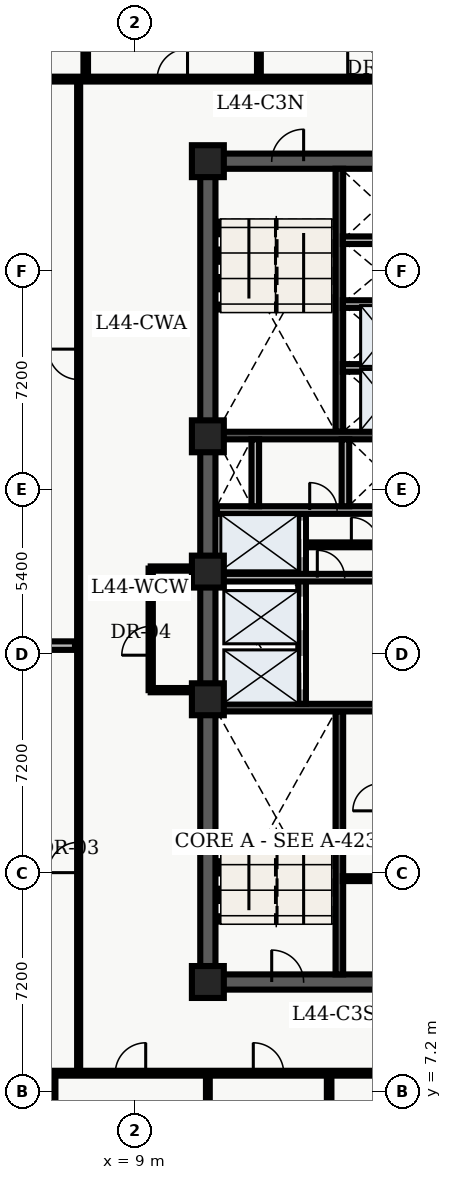
"""IFC4 building model, lengths in metres.
Left out: names, types, materials, properties, quantities, classifications, styles, units other than length and angle.
Written with IfcOpenShell. Run it as: python <this file> out.ifc"""

import sys

from ifc_helpers import new_model, entity, si_unit, converted_unit, direction, frame, origin_with_axes, origin_2d_with_axis, place, context, subcontext, project, spatial, polyline, rectangle, outline, extrude, element, fill, save


model = new_model("IFC4")
c1 = context("Model", 3, precision=1e-05, world=origin_with_axes(), true_north=direction((0.0, 1.0)))
c2 = subcontext(c1, "Body", "Model", "MODEL_VIEW")
j1 = project(units=[si_unit("LENGTHUNIT", "METRE"), converted_unit("PLANEANGLEUNIT", "DEGREE", entity("IfcPlaneAngleMeasure", 0.017), si_unit("PLANEANGLEUNIT", "RADIAN"), dimensions=[0, 0, 0, 0, 0, 0, 0])], contexts=[c1])
p1 = place(None, origin_with_axes())
s1 = spatial("IfcSite", under=j1, at=p1, CompositionType="ELEMENT")
p2 = place(p1, origin_with_axes())
s2 = spatial("IfcBuilding", under=s1, at=p2, CompositionType="ELEMENT")
p3 = place(p2, frame((0.0, 0.0, 179.7), z_axis=(0.0, 0.0, 1.0), x_axis=(1.0, 0.0, 0.0)))
s3 = spatial("IfcBuildingStorey", under=s2, at=p3, CompositionType="ELEMENT", Elevation=179.7)
p4 = place(p3, frame((11.4, 10.8, 0.0), z_axis=(0.0, 0.0, 1.0), x_axis=(0.0, 1.0, 0.0)))
e1 = element("IfcWall", 1, at=p4, inside=s3, PredefinedType="SHEAR", context=c2, shape_type="SweptSolid", body=[
    extrude(outline(polyline([(0.0, -0.25), (27.0, -0.25), (27.0, 0.25), (0.0, 0.25), (0.0, -0.25)])), origin_with_axes(), (0.0, 0.0, 1.0), 3.66),
])
p5 = place(p3, frame((11.4, 10.8, 0.0), z_axis=(0.0, 0.0, 1.0), x_axis=(1.0, 0.0, 0.0)))
e2 = element("IfcWall", 2, at=p5, inside=s3, PredefinedType="SHEAR", context=c2, shape_type="SweptSolid", body=[
    extrude(outline(polyline([(0.0, -0.25), (7.2, -0.25), (7.2, 0.25), (0.0, 0.25), (0.0, -0.25)])), origin_with_axes(), (0.0, 0.0, 1.0), 3.66),
])
p6 = place(p5, frame((2.625, 0.0, 0.0), z_axis=(0.0, 0.0, 1.0), x_axis=(1.0, 0.0, 0.0)))
e3 = element("IfcOpeningElement", 3, at=p6, cuts=e2, PredefinedType="OPENING", context=c2, shape_type="SweptSolid", body=[
    extrude(rectangle(XDim=1.05, YDim=0.52, at=origin_2d_with_axis()), origin_with_axes(), (0.0, 0.0, 1.0), 2.15),
])
p7 = place(p3, frame((11.4, 37.8, 0.0), z_axis=(0.0, 0.0, 1.0), x_axis=(1.0, 0.0, 0.0)))
e4 = element("IfcWall", 4, at=p7, inside=s3, PredefinedType="SHEAR", context=c2, shape_type="SweptSolid", body=[
    extrude(outline(polyline([(0.0, -0.25), (7.2, -0.25), (7.2, 0.25), (0.0, 0.25), (0.0, -0.25)])), origin_with_axes(), (0.0, 0.0, 1.0), 3.66),
])
p8 = place(p7, frame((2.625, 0.0, 0.0), z_axis=(0.0, 0.0, 1.0), x_axis=(1.0, 0.0, 0.0)))
e5 = element("IfcOpeningElement", 5, at=p8, cuts=e4, PredefinedType="OPENING", context=c2, shape_type="SweptSolid", body=[
    extrude(rectangle(XDim=1.05, YDim=0.52, at=origin_2d_with_axis()), origin_with_axes(), (0.0, 0.0, 1.0), 2.15),
])
p9 = place(p3, frame((15.725, 11.05, 0.0), z_axis=(0.0, 0.0, 1.0), x_axis=(0.0, 1.0, 0.0)))
e6 = element("IfcWall", 6, at=p9, inside=s3, PredefinedType="SHEAR", context=c2, shape_type="SweptSolid", body=[
    extrude(outline(polyline([(0.0, -0.125), (8.65, -0.125), (8.65, 0.125), (0.0, 0.125), (0.0, -0.125)])), origin_with_axes(), (0.0, 0.0, 1.0), 3.66),
])
p10 = place(p3, frame((11.65, 19.825, 0.0), z_axis=(0.0, 0.0, 1.0), x_axis=(1.0, 0.0, 0.0)))
e7 = element("IfcWall", 7, at=p10, inside=s3, PredefinedType="SHEAR", context=c2, shape_type="SweptSolid", body=[
    extrude(outline(polyline([(0.0, -0.125), (6.7, -0.125), (6.7, 0.125), (0.0, 0.125), (0.0, -0.125)])), origin_with_axes(), (0.0, 0.0, 1.0), 3.66),
])
p11 = place(p3, frame((15.725, 28.9, 0.0), z_axis=(0.0, 0.0, 1.0), x_axis=(0.0, 1.0, 0.0)))
e8 = element("IfcWall", 8, at=p11, inside=s3, PredefinedType="SHEAR", context=c2, shape_type="SweptSolid", body=[
    extrude(outline(polyline([(0.0, -0.125), (8.65, -0.125), (8.65, 0.125), (0.0, 0.125), (0.0, -0.125)])), origin_with_axes(), (0.0, 0.0, 1.0), 3.66),
])
p12 = place(p3, frame((11.65, 28.775, 0.0), z_axis=(0.0, 0.0, 1.0), x_axis=(1.0, 0.0, 0.0)))
e9 = element("IfcWall", 9, at=p12, inside=s3, PredefinedType="SHEAR", context=c2, shape_type="SweptSolid", body=[
    extrude(outline(polyline([(0.0, -0.125), (6.7, -0.125), (6.7, 0.125), (0.0, 0.125), (0.0, -0.125)])), origin_with_axes(), (0.0, 0.0, 1.0), 3.66),
])
p13 = place(p3, frame((14.5, 19.95, 0.0), z_axis=(0.0, 0.0, 1.0), x_axis=(0.0, 1.0, 0.0)))
e10 = element("IfcWall", 10, at=p13, inside=s3, PredefinedType="SOLIDWALL", context=c2, shape_type="SweptSolid", body=[
    extrude(outline(polyline([(0.0, -0.125), (6.25, -0.125), (6.25, 0.125), (0.0, 0.125), (0.0, -0.125)])), origin_with_axes(), (0.0, 0.0, 1.0), 2.7),
])
p14 = place(p13, frame((1.025, 0.0, 0.0), z_axis=(0.0, 0.0, 1.0), x_axis=(1.0, 0.0, 0.0)))
e11 = element("IfcOpeningElement", 11, at=p14, cuts=e10, PredefinedType="OPENING", context=c2, shape_type="SweptSolid", body=[
    extrude(rectangle(XDim=1.1, YDim=0.27, at=origin_2d_with_axis()), origin_with_axes(), (0.0, 0.0, 1.0), 2.15),
])
p15 = place(p13, frame((2.975, 0.0, 0.0), z_axis=(0.0, 0.0, 1.0), x_axis=(1.0, 0.0, 0.0)))
e12 = element("IfcOpeningElement", 12, at=p15, cuts=e10, PredefinedType="OPENING", context=c2, shape_type="SweptSolid", body=[
    extrude(rectangle(XDim=1.1, YDim=0.27, at=origin_2d_with_axis()), origin_with_axes(), (0.0, 0.0, 1.0), 2.15),
])
p16 = place(p13, frame((5.425, 0.0, 0.0), z_axis=(0.0, 0.0, 1.0), x_axis=(1.0, 0.0, 0.0)))
e13 = element("IfcOpeningElement", 13, at=p16, cuts=e10, PredefinedType="OPENING", context=c2, shape_type="SweptSolid", body=[
    extrude(rectangle(XDim=1.2, YDim=0.27, at=origin_2d_with_axis()), origin_with_axes(), (0.0, 0.0, 1.0), 2.15),
])
p17 = place(p3, frame((11.7, 24.1, 0.0), z_axis=(0.0, 0.0, 1.0), x_axis=(1.0, 0.0, 0.0)))
e14 = element("IfcWall", 14, at=p17, inside=s3, PredefinedType="SOLIDWALL", context=c2, shape_type="SweptSolid", body=[
    extrude(outline(polyline([(0.0, -0.125), (6.6, -0.125), (6.6, 0.125), (0.0, 0.125), (0.0, -0.125)])), origin_with_axes(), (0.0, 0.0, 1.0), 2.7),
])
p18 = place(p17, frame((3.75, 0.0, 0.0), z_axis=(0.0, 0.0, 1.0), x_axis=(1.0, 0.0, 0.0)))
e15 = element("IfcOpeningElement", 15, at=p18, cuts=e14, PredefinedType="OPENING", context=c2, shape_type="SweptSolid", body=[
    extrude(rectangle(XDim=0.9, YDim=0.27, at=origin_2d_with_axis()), origin_with_axes(), (0.0, 0.0, 1.0), 2.15),
])
p19 = place(p3, frame((11.7, 26.325, 0.0), z_axis=(0.0, 0.0, 1.0), x_axis=(1.0, 0.0, 0.0)))
e16 = element("IfcWall", 16, at=p19, inside=s3, PredefinedType="SOLIDWALL", context=c2, shape_type="SweptSolid", body=[
    extrude(outline(polyline([(0.0, -0.125), (6.6, -0.125), (6.6, 0.125), (0.0, 0.125), (0.0, -0.125)])), origin_with_axes(), (0.0, 0.0, 1.0), 2.7),
])
p20 = place(p19, frame((3.5, 0.0, 0.0), z_axis=(0.0, 0.0, 1.0), x_axis=(1.0, 0.0, 0.0)))
e17 = element("IfcOpeningElement", 17, at=p20, cuts=e16, PredefinedType="OPENING", context=c2, shape_type="SweptSolid", body=[
    extrude(rectangle(XDim=0.9, YDim=0.27, at=origin_2d_with_axis()), origin_with_axes(), (0.0, 0.0, 1.0), 2.15),
])
for number, where, z_axis, x_axis in (
    (18, (12.96, 26.45, 0.0), (0.0, 0.0, 1.0), (0.0, 1.0, 0.0)),
    (19, (15.925, 26.45, 0.0), (0.0, 0.0, 1.0), (0.0, 1.0, 0.0)),
):
    element("IfcWall", number, at=place(p3, frame(where, z_axis=z_axis, x_axis=x_axis)), inside=s3, PredefinedType="SOLIDWALL", context=c2, shape_type="SweptSolid", body=[
        extrude(outline(polyline([(0.0, -0.125), (2.2, -0.125), (2.2, 0.125), (0.0, 0.125), (0.0, -0.125)])), origin_with_axes(), (0.0, 0.0, 1.0), 2.7),
    ])
for number, where, z_axis, x_axis in (
    (20, (11.4, 10.8, 0.0), (0.0, 0.0, 1.0), (1.0, 0.0, 0.0)),
    (21, (11.4, 20.1, 0.0), (0.0, 0.0, 1.0), (1.0, 0.0, 0.0)),
    (22, (11.4, 24.3, 0.0), (0.0, 0.0, 1.0), (1.0, 0.0, 0.0)),
    (23, (11.4, 28.75, 0.0), (0.0, 0.0, 1.0), (1.0, 0.0, 0.0)),
    (24, (11.4, 37.8, 0.0), (0.0, 0.0, 1.0), (1.0, 0.0, 0.0)),
):
    element("IfcColumn", number, at=place(p3, frame(where, z_axis=z_axis, x_axis=x_axis)), inside=s3, PredefinedType="COLUMN", context=c2, shape_type="SweptSolid", body=[
        extrude(rectangle(XDim=1.05, YDim=1.05, at=origin_2d_with_axis()), origin_with_axes(), (0.0, 0.0, 1.0), 3.9),
    ])
p21 = place(p3, frame((14.62, 25.18, 0.0), z_axis=(0.0, 0.0, 1.0), x_axis=(1.0, 0.0, 0.0)))
e25 = element("IfcWall", 25, at=p21, inside=s3, PredefinedType="PARTITIONING", context=c2, shape_type="SweptSolid", body=[
    extrude(outline(polyline([(0.0, -0.08), (3.68, -0.08), (3.68, 0.08), (0.0, 0.08), (0.0, -0.08)])), origin_with_axes(), (0.0, 0.0, 1.0), 2.7),
])
p22 = place(p21, frame((1.95, 0.0, 0.0), z_axis=(0.0, 0.0, 1.0), x_axis=(1.0, 0.0, 0.0)))
e26 = element("IfcOpeningElement", 26, at=p22, cuts=e25, PredefinedType="OPENING", context=c2, shape_type="SweptSolid", body=[
    extrude(rectangle(XDim=0.9, YDim=0.18, at=origin_2d_with_axis()), origin_with_axes(), (0.0, 0.0, 1.0), 2.15),
])
p23 = place(p3, frame((15.84, 14.2, 0.0), z_axis=(0.0, 0.0, 1.0), x_axis=(1.0, 0.0, 0.0)))
e27 = element("IfcWall", 27, at=p23, inside=s3, PredefinedType="PARTITIONING", context=c2, shape_type="SweptSolid", body=[
    extrude(outline(polyline([(0.0, -0.08), (2.46, -0.08), (2.46, 0.08), (0.0, 0.08), (0.0, -0.08)])), origin_with_axes(), (0.0, 0.0, 1.0), 2.7),
])
for number, where, z_axis, x_axis in (
    (28, (15.84, 31.0, 0.0), (0.0, 0.0, 1.0), (1.0, 0.0, 0.0)),
    (29, (15.84, 33.1, 0.0), (0.0, 0.0, 1.0), (1.0, 0.0, 0.0)),
    (30, (15.84, 35.2, 0.0), (0.0, 0.0, 1.0), (1.0, 0.0, 0.0)),
):
    element("IfcWall", number, at=place(p3, frame(where, z_axis=z_axis, x_axis=x_axis)), inside=s3, PredefinedType="SOLIDWALL", context=c2, shape_type="SweptSolid", body=[
        extrude(outline(polyline([(0.0, -0.125), (2.46, -0.125), (2.46, 0.125), (0.0, 0.125), (0.0, -0.125)])), origin_with_axes(), (0.0, 0.0, 1.0), 2.7),
    ])
p24 = place(p3, frame((9.52, 20.4, 0.0), z_axis=(0.0, 0.0, 1.0), x_axis=(0.0, 1.0, 0.0)))
e31 = element("IfcWall", 31, at=p24, inside=s3, PredefinedType="PARTITIONING", context=c2, shape_type="SweptSolid", body=[
    extrude(outline(polyline([(0.0, -0.07), (4.0, -0.07), (4.0, 0.07), (0.0, 0.07), (0.0, -0.07)])), origin_with_axes(), (0.0, 0.0, 1.0), 2.7),
])
p25 = place(p24, frame((1.625, 0.0, 0.0), z_axis=(0.0, 0.0, 1.0), x_axis=(1.0, 0.0, 0.0)))
e32 = element("IfcOpeningElement", 32, at=p25, cuts=e31, PredefinedType="OPENING", context=c2, shape_type="SweptSolid", body=[
    extrude(rectangle(XDim=0.95, YDim=0.16, at=origin_2d_with_axis()), origin_with_axes(), (0.0, 0.0, 1.0), 2.15),
])
for number, where, z_axis, x_axis in (
    (33, (9.52, 20.4, 0.0), (0.0, 0.0, 1.0), (1.0, 0.0, 0.0)),
    (34, (9.52, 24.4, 0.0), (0.0, 0.0, 1.0), (1.0, 0.0, 0.0)),
):
    element("IfcWall", number, at=place(p3, frame(where, z_axis=z_axis, x_axis=x_axis)), inside=s3, PredefinedType="PARTITIONING", context=c2, shape_type="SweptSolid", body=[
        extrude(outline(polyline([(0.0, -0.07), (1.58, -0.07), (1.58, 0.07), (0.0, 0.07), (0.0, -0.07)])), origin_with_axes(), (0.0, 0.0, 1.0), 2.7),
    ])
p26 = place(p3, frame((2.6, 7.8, 0.0), z_axis=(0.0, 0.0, 1.0), x_axis=(1.0, 0.0, 0.0)))
e35 = element("IfcWall", 35, at=p26, inside=s3, PredefinedType="PARTITIONING", context=c2, shape_type="SweptSolid", body=[
    extrude(outline(polyline([(0.0, -0.08), (18.55, -0.08), (18.55, 0.08), (0.0, 0.08), (0.0, -0.08)])), origin_with_axes(), (0.0, 0.0, 1.0), 2.7),
])
p27 = place(p26, frame((1.851, 0.0, 0.0), z_axis=(0.0, 0.0, 1.0), x_axis=(1.0, 0.0, 0.0)))
e36 = element("IfcOpeningElement", 36, at=p27, cuts=e35, PredefinedType="OPENING", context=c2, shape_type="SweptSolid", body=[
    extrude(rectangle(XDim=1.0, YDim=0.18, at=origin_2d_with_axis()), origin_with_axes(), (0.0, 0.0, 1.0), 2.15),
])
p28 = place(p26, frame((6.255, 0.0, 0.0), z_axis=(0.0, 0.0, 1.0), x_axis=(1.0, 0.0, 0.0)))
e37 = element("IfcOpeningElement", 37, at=p28, cuts=e35, PredefinedType="OPENING", context=c2, shape_type="SweptSolid", body=[
    extrude(rectangle(XDim=1.0, YDim=0.18, at=origin_2d_with_axis()), origin_with_axes(), (0.0, 0.0, 1.0), 2.15),
])
p29 = place(p26, frame((10.794, 0.0, 0.0), z_axis=(0.0, 0.0, 1.0), x_axis=(1.0, 0.0, 0.0)))
e38 = element("IfcOpeningElement", 38, at=p29, cuts=e35, PredefinedType="OPENING", context=c2, shape_type="SweptSolid", body=[
    extrude(rectangle(XDim=1.0, YDim=0.18, at=origin_2d_with_axis()), origin_with_axes(), (0.0, 0.0, 1.0), 2.15),
])
p30 = place(p26, frame((15.645, 0.0, 0.0), z_axis=(0.0, 0.0, 1.0), x_axis=(1.0, 0.0, 0.0)))
e39 = element("IfcOpeningElement", 39, at=p30, cuts=e35, PredefinedType="OPENING", context=c2, shape_type="SweptSolid", body=[
    extrude(rectangle(XDim=1.0, YDim=0.18, at=origin_2d_with_axis()), origin_with_axes(), (0.0, 0.0, 1.0), 2.15),
])
p31 = place(p3, frame((2.6, 40.5, 0.0), z_axis=(0.0, 0.0, 1.0), x_axis=(1.0, 0.0, 0.0)))
e40 = element("IfcWall", 40, at=p31, inside=s3, PredefinedType="PARTITIONING", context=c2, shape_type="SweptSolid", body=[
    extrude(outline(polyline([(0.0, -0.08), (22.87, -0.08), (22.87, 0.08), (0.0, 0.08), (0.0, -0.08)])), origin_with_axes(), (0.0, 0.0, 1.0), 2.7),
])
p32 = place(p31, frame((2.386, 0.0, 0.0), z_axis=(0.0, 0.0, 1.0), x_axis=(1.0, 0.0, 0.0)))
e41 = element("IfcOpeningElement", 41, at=p32, cuts=e40, PredefinedType="OPENING", context=c2, shape_type="SweptSolid", body=[
    extrude(rectangle(XDim=1.0, YDim=0.18, at=origin_2d_with_axis()), origin_with_axes(), (0.0, 0.0, 1.0), 2.15),
])
p33 = place(p31, frame((7.631, 0.0, 0.0), z_axis=(0.0, 0.0, 1.0), x_axis=(1.0, 0.0, 0.0)))
e42 = element("IfcOpeningElement", 42, at=p33, cuts=e40, PredefinedType="OPENING", context=c2, shape_type="SweptSolid", body=[
    extrude(rectangle(XDim=1.0, YDim=0.18, at=origin_2d_with_axis()), origin_with_axes(), (0.0, 0.0, 1.0), 2.15),
])
p34 = place(p31, frame((13.999, 0.0, 0.0), z_axis=(0.0, 0.0, 1.0), x_axis=(1.0, 0.0, 0.0)))
e43 = element("IfcOpeningElement", 43, at=p34, cuts=e40, PredefinedType="OPENING", context=c2, shape_type="SweptSolid", body=[
    extrude(rectangle(XDim=1.2, YDim=0.18, at=origin_2d_with_axis()), origin_with_axes(), (0.0, 0.0, 1.0), 2.2),
])
p35 = place(p3, frame((7.15, 7.8, 0.0), z_axis=(0.0, 0.0, 1.0), x_axis=(0.0, 1.0, 0.0)))
e44 = element("IfcWall", 44, at=p35, inside=s3, PredefinedType="PARTITIONING", context=c2, shape_type="SweptSolid", body=[
    extrude(outline(polyline([(0.0, -0.05), (32.7, -0.05), (32.7, 0.05), (0.0, 0.05), (0.0, -0.05)])), origin_with_axes(), (0.0, 0.0, 1.0), 2.7),
])
p36 = place(p35, frame((7.098, 0.0, 0.0), z_axis=(0.0, 0.0, 1.0), x_axis=(1.0, 0.0, 0.0)))
e45 = element("IfcOpeningElement", 45, at=p36, cuts=e44, PredefinedType="OPENING", context=c2, shape_type="SweptSolid", body=[
    extrude(rectangle(XDim=1.0, YDim=0.12, at=origin_2d_with_axis()), origin_with_axes(), (0.0, 0.0, 1.0), 2.15),
])
p37 = place(p35, frame((23.317, 0.0, 0.0), z_axis=(0.0, 0.0, 1.0), x_axis=(1.0, 0.0, 0.0)))
e46 = element("IfcOpeningElement", 46, at=p37, cuts=e44, PredefinedType="OPENING", context=c2, shape_type="SweptSolid", body=[
    extrude(rectangle(XDim=1.0, YDim=0.12, at=origin_2d_with_axis()), origin_with_axes(), (0.0, 0.0, 1.0), 2.15),
])
p38 = place(p3, frame((0.335, 21.865, 0.0), z_axis=(0.0, 0.0, 1.0), x_axis=(1.0, 0.0, 0.0)))
e47 = element("IfcWall", 47, at=p38, inside=s3, PredefinedType="PARTITIONING", context=c2, shape_type="SweptSolid", body=[
    extrude(outline(polyline([(0.0, -0.14), (6.695, -0.14), (6.695, 0.14), (0.0, 0.14), (0.0, -0.14)])), origin_with_axes(), (0.0, 0.0, 1.0), 2.7),
])
p39 = place(p3, frame((6.311, 0.335, 0.0), z_axis=(0.0, 0.0, 1.0), x_axis=(0.0, 1.0, 0.0)))
e48 = element("IfcWall", 48, at=p39, inside=s3, PredefinedType="PARTITIONING", context=c2, shape_type="SweptSolid", body=[
    extrude(outline(polyline([(0.0, -0.075), (7.365, -0.075), (7.365, 0.075), (0.0, 0.075), (0.0, -0.075)])), origin_with_axes(), (0.0, 0.0, 1.0), 2.7),
])
p40 = place(p3, frame((11.4, 0.335, 0.0), z_axis=(0.0, 0.0, 1.0), x_axis=(0.0, 1.0, 0.0)))
e49 = element("IfcWall", 49, at=p40, inside=s3, PredefinedType="PARTITIONING", context=c2, shape_type="SweptSolid", body=[
    extrude(outline(polyline([(0.0, -0.062), (7.365, -0.062), (7.365, 0.062), (0.0, 0.062), (0.0, -0.062)])), origin_with_axes(), (0.0, 0.0, 1.0), 2.7),
])
p41 = place(p3, frame((15.389, 0.335, 0.0), z_axis=(0.0, 0.0, 1.0), x_axis=(0.0, 1.0, 0.0)))
e50 = element("IfcWall", 50, at=p41, inside=s3, PredefinedType="PARTITIONING", context=c2, shape_type="SweptSolid", body=[
    extrude(outline(polyline([(0.0, -0.075), (7.365, -0.075), (7.365, 0.075), (0.0, 0.075), (0.0, -0.075)])), origin_with_axes(), (0.0, 0.0, 1.0), 2.7),
])
p42 = place(p3, frame((7.383, 40.6, 0.0), z_axis=(0.0, 0.0, 1.0), x_axis=(0.0, 1.0, 0.0)))
e51 = element("IfcWall", 51, at=p42, inside=s3, PredefinedType="PARTITIONING", context=c2, shape_type="SweptSolid", body=[
    extrude(outline(polyline([(0.0, -0.075), (7.665, -0.075), (7.665, 0.075), (0.0, 0.075), (0.0, -0.075)])), origin_with_axes(), (0.0, 0.0, 1.0), 2.7),
])
p43 = place(p3, frame((13.079, 40.6, 0.0), z_axis=(0.0, 0.0, 1.0), x_axis=(0.0, 1.0, 0.0)))
e52 = element("IfcWall", 52, at=p43, inside=s3, PredefinedType="PARTITIONING", context=c2, shape_type="SweptSolid", body=[
    extrude(outline(polyline([(0.0, -0.062), (7.665, -0.062), (7.665, 0.062), (0.0, 0.062), (0.0, -0.062)])), origin_with_axes(), (0.0, 0.0, 1.0), 2.7),
])
p44 = place(p13, frame((1.025, 0.0, 0.0), z_axis=(0.0, 0.0, 1.0), x_axis=(1.0, 0.0, 0.0)))
e53 = element("IfcDoor", 53, at=p44, inside=s3, OperationType="SLIDING_TO_LEFT", PredefinedType="DOOR", context=c2, shape_type="SweptSolid", body=[
    extrude(rectangle(XDim=1.1, YDim=0.09, at=origin_2d_with_axis()), origin_with_axes(), (0.0, 0.0, 1.0), 2.15),
])
fill(e11, e53)
p45 = place(p13, frame((2.975, 0.0, 0.0), z_axis=(0.0, 0.0, 1.0), x_axis=(1.0, 0.0, 0.0)))
e54 = element("IfcDoor", 54, at=p45, inside=s3, OperationType="SLIDING_TO_RIGHT", PredefinedType="DOOR", context=c2, shape_type="SweptSolid", body=[
    extrude(rectangle(XDim=1.1, YDim=0.09, at=origin_2d_with_axis()), origin_with_axes(), (0.0, 0.0, 1.0), 2.15),
])
fill(e12, e54)
p46 = place(p13, frame((5.425, 0.0, 0.0), z_axis=(0.0, 0.0, 1.0), x_axis=(1.0, 0.0, 0.0)))
e55 = element("IfcDoor", 55, at=p46, inside=s3, OperationType="DOUBLE_DOOR_SLIDING", PredefinedType="DOOR", context=c2, shape_type="SweptSolid", body=[
    extrude(rectangle(XDim=1.2, YDim=0.09, at=origin_2d_with_axis()), origin_with_axes(), (0.0, 0.0, 1.0), 2.15),
])
fill(e13, e55)
p47 = place(p5, frame((2.625, 0.0, 0.0), z_axis=(0.0, 0.0, 1.0), x_axis=(1.0, 0.0, 0.0)))
e56 = element("IfcDoor", 56, at=p47, inside=s3, OperationType="SINGLE_SWING_LEFT", PredefinedType="DOOR", context=c2, shape_type="SweptSolid", body=[
    extrude(rectangle(XDim=1.05, YDim=0.09, at=origin_2d_with_axis()), origin_with_axes(), (0.0, 0.0, 1.0), 2.15),
])
fill(e3, e56)
p48 = place(p7, frame((2.625, 0.0, 0.0), z_axis=(0.0, 0.0, 1.0), x_axis=(1.0, 0.0, 0.0)))
e57 = element("IfcDoor", 57, at=p48, inside=s3, OperationType="SINGLE_SWING_RIGHT", PredefinedType="DOOR", context=c2, shape_type="SweptSolid", body=[
    extrude(rectangle(XDim=1.05, YDim=0.09, at=origin_2d_with_axis()), origin_with_axes(), (0.0, 0.0, 1.0), 2.15),
])
fill(e5, e57)
p49 = place(p19, frame((3.5, 0.0, 0.0), z_axis=(0.0, 0.0, 1.0), x_axis=(1.0, 0.0, 0.0)))
e58 = element("IfcDoor", 58, at=p49, inside=s3, OperationType="SINGLE_SWING_LEFT", PredefinedType="DOOR", context=c2, shape_type="SweptSolid", body=[
    extrude(rectangle(XDim=0.9, YDim=0.09, at=origin_2d_with_axis()), origin_with_axes(), (0.0, 0.0, 1.0), 2.15),
])
fill(e17, e58)
p50 = place(p17, frame((3.75, 0.0, 0.0), z_axis=(0.0, 0.0, 1.0), x_axis=(1.0, 0.0, 0.0)))
e59 = element("IfcDoor", 59, at=p50, inside=s3, OperationType="SINGLE_SWING_LEFT", PredefinedType="DOOR", context=c2, shape_type="SweptSolid", body=[
    extrude(rectangle(XDim=0.9, YDim=0.09, at=origin_2d_with_axis()), origin_with_axes(), (0.0, 0.0, 1.0), 2.15),
])
fill(e15, e59)
p51 = place(p21, frame((1.95, 0.0, 0.0), z_axis=(0.0, 0.0, 1.0), x_axis=(1.0, 0.0, 0.0)))
e60 = element("IfcDoor", 60, at=p51, inside=s3, OperationType="SINGLE_SWING_LEFT", PredefinedType="DOOR", context=c2, shape_type="SweptSolid", body=[
    extrude(rectangle(XDim=0.9, YDim=0.09, at=origin_2d_with_axis()), origin_with_axes(), (0.0, 0.0, 1.0), 2.15),
])
fill(e26, e60)
p52 = place(p24, frame((1.625, 0.0, 0.0), z_axis=(0.0, 0.0, 1.0), x_axis=(1.0, 0.0, 0.0)))
e61 = element("IfcDoor", 61, at=p52, inside=s3, OperationType="SINGLE_SWING_LEFT", PredefinedType="DOOR", context=c2, shape_type="SweptSolid", body=[
    extrude(rectangle(XDim=0.95, YDim=0.084, at=origin_2d_with_axis()), origin_with_axes(), (0.0, 0.0, 1.0), 2.15),
])
fill(e32, e61)
p53 = place(p35, frame((7.098, 0.0, 0.0), z_axis=(0.0, 0.0, 1.0), x_axis=(1.0, 0.0, 0.0)))
e62 = element("IfcDoor", 62, at=p53, inside=s3, OperationType="SINGLE_SWING_LEFT", PredefinedType="DOOR", context=c2, shape_type="SweptSolid", body=[
    extrude(rectangle(XDim=1.0, YDim=0.06, at=origin_2d_with_axis()), origin_with_axes(), (0.0, 0.0, 1.0), 2.15),
])
fill(e45, e62)
p54 = place(p35, frame((23.317, 0.0, 0.0), z_axis=(0.0, 0.0, 1.0), x_axis=(1.0, 0.0, 0.0)))
e63 = element("IfcDoor", 63, at=p54, inside=s3, OperationType="SINGLE_SWING_RIGHT", PredefinedType="DOOR", context=c2, shape_type="SweptSolid", body=[
    extrude(rectangle(XDim=1.0, YDim=0.06, at=origin_2d_with_axis()), origin_with_axes(), (0.0, 0.0, 1.0), 2.15),
])
fill(e46, e63)
p55 = place(p26, frame((6.255, 0.0, 0.0), z_axis=(0.0, 0.0, 1.0), x_axis=(1.0, 0.0, 0.0)))
e64 = element("IfcDoor", 64, at=p55, inside=s3, OperationType="SINGLE_SWING_RIGHT", PredefinedType="DOOR", context=c2, shape_type="SweptSolid", body=[
    extrude(rectangle(XDim=1.0, YDim=0.09, at=origin_2d_with_axis()), origin_with_axes(), (0.0, 0.0, 1.0), 2.15),
])
fill(e37, e64)
p56 = place(p26, frame((10.794, 0.0, 0.0), z_axis=(0.0, 0.0, 1.0), x_axis=(1.0, 0.0, 0.0)))
e65 = element("IfcDoor", 65, at=p56, inside=s3, OperationType="SINGLE_SWING_LEFT", PredefinedType="DOOR", context=c2, shape_type="SweptSolid", body=[
    extrude(rectangle(XDim=1.0, YDim=0.09, at=origin_2d_with_axis()), origin_with_axes(), (0.0, 0.0, 1.0), 2.15),
])
fill(e38, e65)
p57 = place(p31, frame((7.631, 0.0, 0.0), z_axis=(0.0, 0.0, 1.0), x_axis=(1.0, 0.0, 0.0)))
e66 = element("IfcDoor", 66, at=p57, inside=s3, OperationType="SINGLE_SWING_RIGHT", PredefinedType="DOOR", context=c2, shape_type="SweptSolid", body=[
    extrude(rectangle(XDim=1.0, YDim=0.09, at=origin_2d_with_axis()), origin_with_axes(), (0.0, 0.0, 1.0), 2.15),
])
fill(e42, e66)
p58 = place(p31, frame((13.999, 0.0, 0.0), z_axis=(0.0, 0.0, 1.0), x_axis=(1.0, 0.0, 0.0)))
e67 = element("IfcDoor", 67, at=p58, inside=s3, OperationType="SINGLE_SWING_LEFT", PredefinedType="DOOR", context=c2, shape_type="SweptSolid", body=[
    extrude(rectangle(XDim=1.2, YDim=0.09, at=origin_2d_with_axis()), origin_with_axes(), (0.0, 0.0, 1.0), 2.2),
])
fill(e43, e67)
save(model, sys.argv[1])
